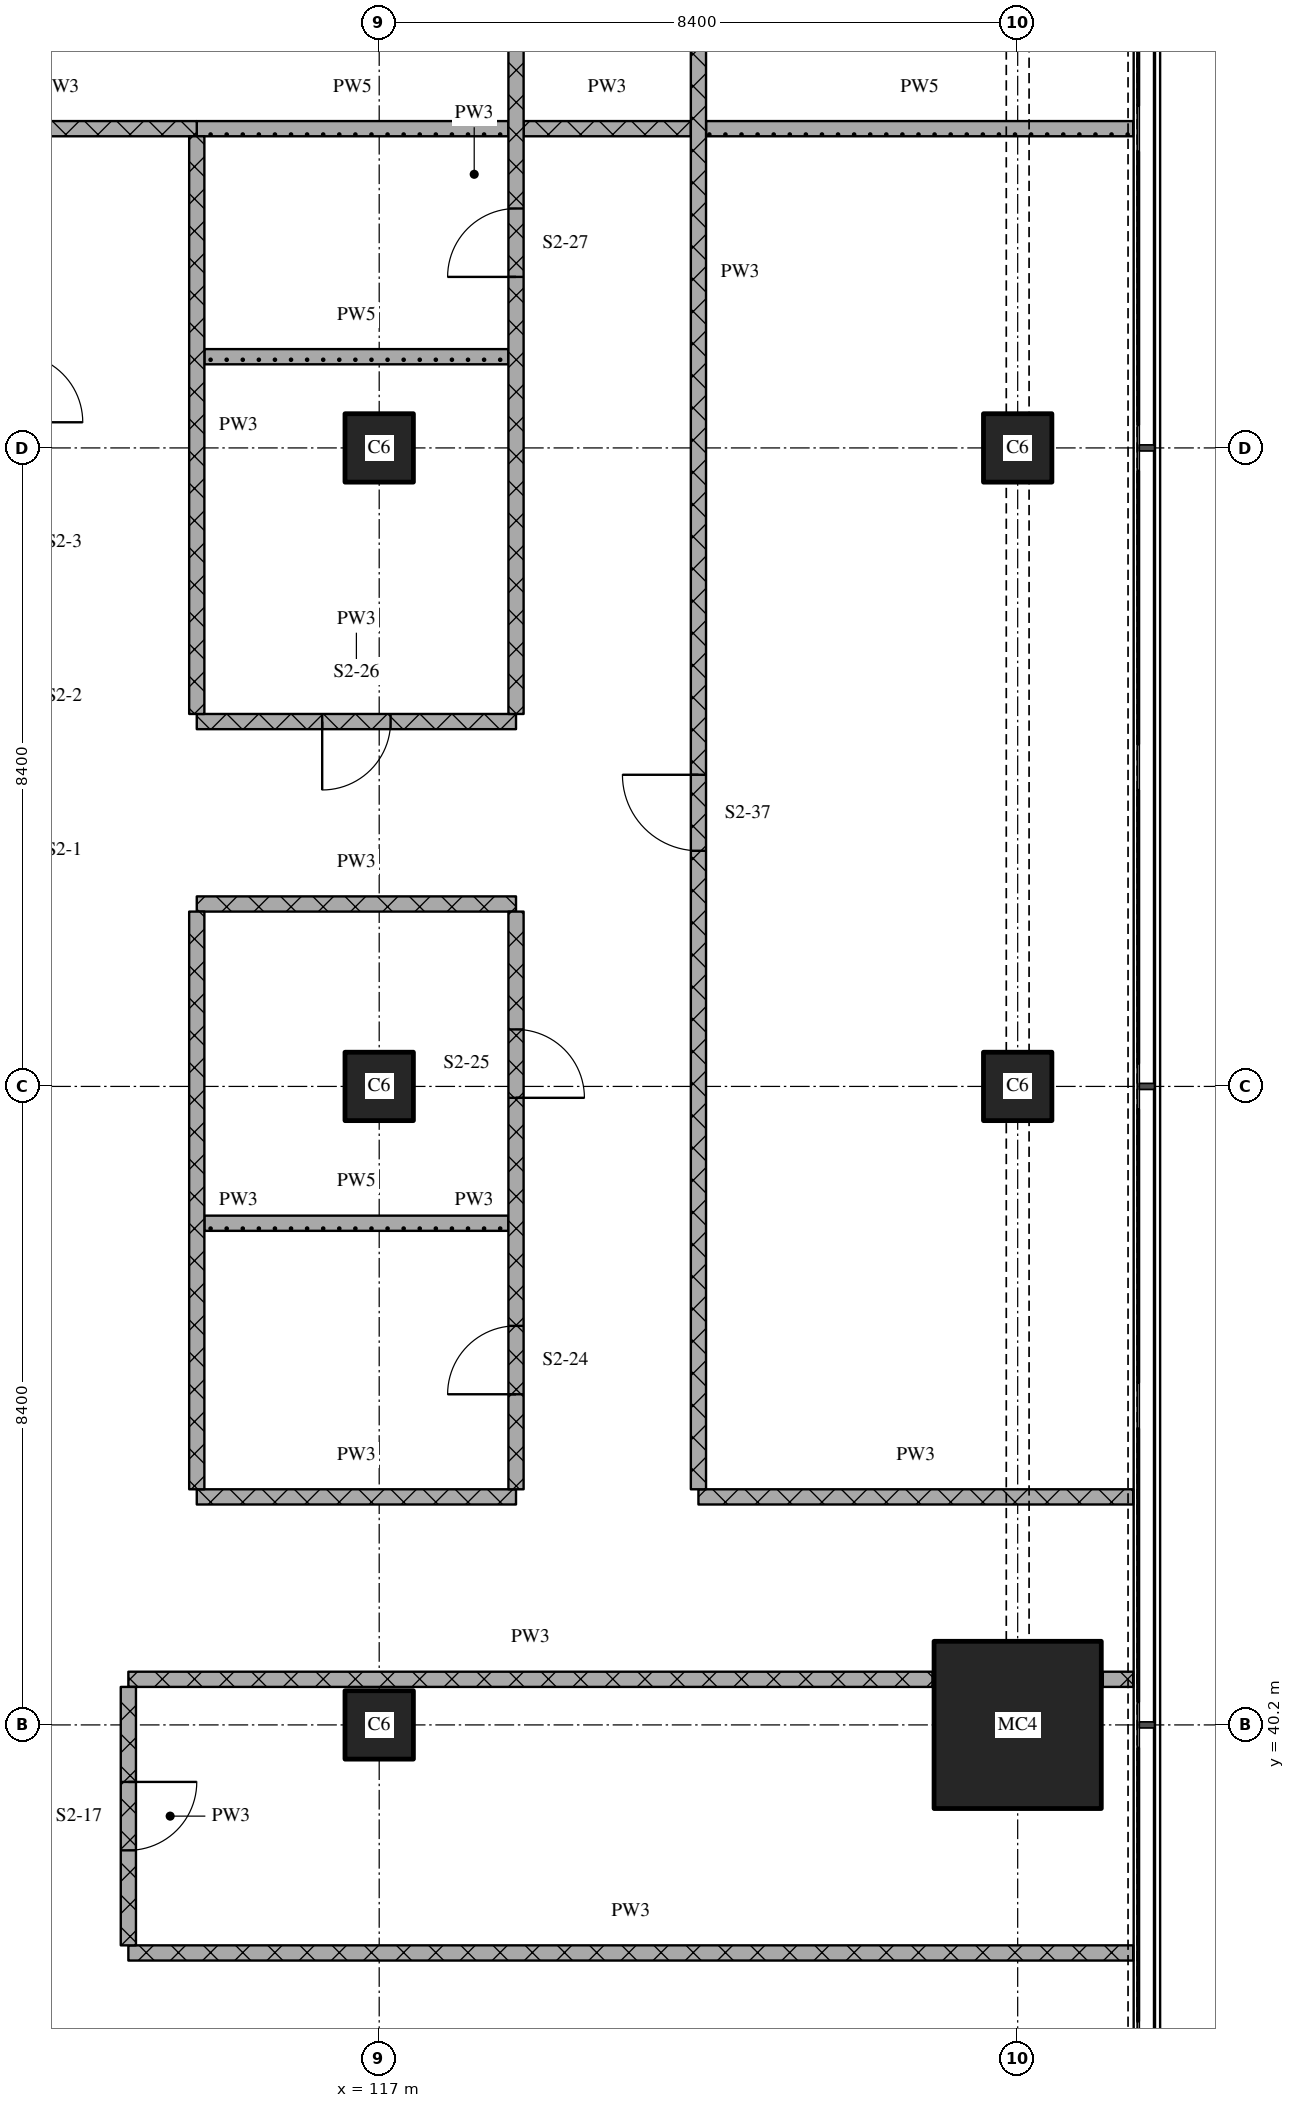
"""IFC4 building model, lengths in metres.
Left out: names, types, materials, properties, quantities, classifications, styles, units other than length and angle.
Written with IfcOpenShell. Run it as: python <this file> out.ifc"""

import sys

from ifc_helpers import new_model, si_unit, direction, frame, frame_2d, origin, origin_2d, place, context, subcontext, project, spatial, rectangle, extrude, element, fill, save


model = new_model("IFC4")
c1 = context("Model", 3, precision=1e-05, world=origin(), true_north=direction((0.0, 1.0)))
c2 = subcontext(c1, "Body", "Model", "MODEL_VIEW")
j1 = project(units=[si_unit("LENGTHUNIT", "METRE"), si_unit("PLANEANGLEUNIT", "RADIAN")], contexts=[c1])
p1 = place(None, origin())
s1 = spatial("IfcSite", under=j1, at=p1, CompositionType="ELEMENT")
p2 = place(p1, origin())
s2 = spatial("IfcBuilding", under=s1, at=p2, CompositionType="ELEMENT")
p3 = place(p2, frame((0.0, 0.0, 23.7)))
s3 = spatial("IfcBuildingStorey", under=s2, at=p3, CompositionType="ELEMENT", Elevation=23.7)
for number, where, z_axis, x_axis in (
    (1, (117.0, 40.2, 0.0), (0.0, 0.0, 1.0), (1.0, 0.0, 0.0)),
    (2, (117.0, 48.6, 0.0), (0.0, 0.0, 1.0), (1.0, 0.0, 0.0)),
    (3, (117.0, 57.0, 0.0), (0.0, 0.0, 1.0), (1.0, 0.0, 0.0)),
):
    element("IfcColumn", number, at=place(p3, frame(where, z_axis=z_axis, x_axis=x_axis)), inside=s3, PredefinedType="COLUMN", context=c2, shape_type="SweptSolid", body=[
        extrude(rectangle(XDim=0.9, YDim=0.9, at=origin_2d()), origin(), (0.0, 0.0, 1.0), 4.5),
    ])
p4 = place(p3, frame((125.4, 40.2, 0.0), z_axis=(0.0, 0.0, 1.0), x_axis=(1.0, 0.0, 0.0)))
e4 = element("IfcColumn", 4, at=p4, inside=s3, PredefinedType="COLUMN", context=c2, shape_type="SweptSolid", body=[
    extrude(rectangle(XDim=2.2, YDim=2.2, at=origin_2d()), origin(), (0.0, 0.0, 1.0), 4.5),
])
for number, where, z_axis, x_axis in (
    (5, (125.4, 48.6, 0.0), (0.0, 0.0, 1.0), (1.0, 0.0, 0.0)),
    (6, (125.4, 57.0, 0.0), (0.0, 0.0, 1.0), (1.0, 0.0, 0.0)),
):
    element("IfcColumn", number, at=place(p3, frame(where, z_axis=z_axis, x_axis=x_axis)), inside=s3, PredefinedType="COLUMN", context=c2, shape_type="SweptSolid", body=[
        extrude(rectangle(XDim=0.9, YDim=0.9, at=origin_2d()), origin(), (0.0, 0.0, 1.0), 4.5),
    ])
p5 = place(p3, frame((113.7, 37.2, 0.0), z_axis=(0.0, 0.0, 1.0), x_axis=(1.0, 0.0, 0.0)))
e7 = element("IfcWall", 7, at=p5, inside=s3, PredefinedType="PARTITIONING", context=c2, shape_type="SweptSolid", body=[
    extrude(rectangle(XDim=13.22, YDim=0.2, at=frame_2d((6.61, 0.0))), origin(), (0.0, 0.0, 1.0), 4.2),
])
p6 = place(p3, frame((113.7, 40.8, 0.0), z_axis=(0.0, 0.0, 1.0), x_axis=(1.0, 0.0, 0.0)))
e8 = element("IfcWall", 8, at=p6, inside=s3, PredefinedType="PARTITIONING", context=c2, shape_type="SweptSolid", body=[
    extrude(rectangle(XDim=10.58, YDim=0.2, at=frame_2d((5.29, 0.0))), origin(), (0.0, 0.0, 1.0), 4.2),
])
p7 = place(p3, frame((126.52, 40.8, 0.0), z_axis=(0.0, 0.0, 1.0), x_axis=(1.0, 0.0, 0.0)))
e9 = element("IfcWall", 9, at=p7, inside=s3, PredefinedType="PARTITIONING", context=c2, shape_type="SweptSolid", body=[
    extrude(rectangle(XDim=0.4, YDim=0.2, at=frame_2d((0.2, 0.0))), origin(), (0.0, 0.0, 1.0), 4.2),
])
p8 = place(p3, frame((114.6, 43.2, 0.0), z_axis=(0.0, 0.0, 1.0), x_axis=(1.0, 0.0, 0.0)))
e10 = element("IfcWall", 10, at=p8, inside=s3, PredefinedType="PARTITIONING", context=c2, shape_type="SweptSolid", body=[
    extrude(rectangle(XDim=4.2, YDim=0.2, at=frame_2d((2.1, 0.0))), origin(), (0.0, 0.0, 1.0), 4.2),
])
p9 = place(p3, frame((121.2, 43.2, 0.0), z_axis=(0.0, 0.0, 1.0), x_axis=(1.0, 0.0, 0.0)))
e11 = element("IfcWall", 11, at=p9, inside=s3, PredefinedType="PARTITIONING", context=c2, shape_type="SweptSolid", body=[
    extrude(rectangle(XDim=5.72, YDim=0.2, at=frame_2d((2.86, 0.0))), origin(), (0.0, 0.0, 1.0), 4.2),
])
p10 = place(p3, frame((114.7, 46.8, 0.0), z_axis=(0.0, 0.0, 1.0), x_axis=(1.0, 0.0, 0.0)))
e12 = element("IfcWall", 12, at=p10, inside=s3, PredefinedType="PARTITIONING", context=c2, shape_type="SweptSolid", body=[
    extrude(rectangle(XDim=4.0, YDim=0.2, at=frame_2d((2.0, 0.0))), origin(), (0.0, 0.0, 1.0), 4.2),
])
p11 = place(p3, frame((114.6, 51.0, 0.0), z_axis=(0.0, 0.0, 1.0), x_axis=(1.0, 0.0, 0.0)))
e13 = element("IfcWall", 13, at=p11, inside=s3, PredefinedType="PARTITIONING", context=c2, shape_type="SweptSolid", body=[
    extrude(rectangle(XDim=4.2, YDim=0.2, at=frame_2d((2.1, 0.0))), origin(), (0.0, 0.0, 1.0), 4.2),
])
p12 = place(p3, frame((114.6, 53.4, 0.0), z_axis=(0.0, 0.0, 1.0), x_axis=(1.0, 0.0, 0.0)))
e14 = element("IfcWall", 14, at=p12, inside=s3, PredefinedType="PARTITIONING", context=c2, shape_type="SweptSolid", body=[
    extrude(rectangle(XDim=4.2, YDim=0.2, at=frame_2d((2.1, 0.0))), origin(), (0.0, 0.0, 1.0), 4.2),
])
p13 = place(p12, frame((1.65, 0.0, 0.0)))
e15 = element("IfcOpeningElement", 15, at=p13, cuts=e14, PredefinedType="OPENING", context=c2, shape_type="SweptSolid", body=[
    extrude(rectangle(XDim=0.9, YDim=2.1, at=frame_2d((0.45, 1.05))), frame((0.0, 0.11, 0.0), z_axis=(0.0, -1.0, 0.0), x_axis=(1.0, 0.0, 0.0)), (0.0, 0.0, 1.0), 0.22),
])
p14 = place(p3, frame((114.7, 58.2, 0.0), z_axis=(0.0, 0.0, 1.0), x_axis=(1.0, 0.0, 0.0)))
e16 = element("IfcWall", 16, at=p14, inside=s3, PredefinedType="PARTITIONING", context=c2, shape_type="SweptSolid", body=[
    extrude(rectangle(XDim=4.0, YDim=0.2, at=frame_2d((2.0, 0.0))), origin(), (0.0, 0.0, 1.0), 4.2),
])
p15 = place(p3, frame((111.0, 61.2, 0.0), z_axis=(0.0, 0.0, 1.0), x_axis=(1.0, 0.0, 0.0)))
e17 = element("IfcWall", 17, at=p15, inside=s3, PredefinedType="PARTITIONING", context=c2, shape_type="SweptSolid", body=[
    extrude(rectangle(XDim=3.6, YDim=0.2, at=frame_2d((1.8, 0.0))), origin(), (0.0, 0.0, 1.0), 4.2),
])
p16 = place(p3, frame((118.9, 61.2, 0.0), z_axis=(0.0, 0.0, 1.0), x_axis=(1.0, 0.0, 0.0)))
e18 = element("IfcWall", 18, at=p16, inside=s3, PredefinedType="PARTITIONING", context=c2, shape_type="SweptSolid", body=[
    extrude(rectangle(XDim=2.2, YDim=0.2, at=frame_2d((1.1, 0.0))), origin(), (0.0, 0.0, 1.0), 4.2),
])
p17 = place(p3, frame((114.6, 61.2, 0.0), z_axis=(0.0, 0.0, 1.0), x_axis=(1.0, 0.0, 0.0)))
e19 = element("IfcWall", 19, at=p17, inside=s3, PredefinedType="PARTITIONING", context=c2, shape_type="SweptSolid", body=[
    extrude(rectangle(XDim=4.1, YDim=0.2, at=frame_2d((2.05, 0.0))), origin(), (0.0, 0.0, 1.0), 4.2),
])
p18 = place(p3, frame((121.3, 61.2, 0.0), z_axis=(0.0, 0.0, 1.0), x_axis=(1.0, 0.0, 0.0)))
e20 = element("IfcWall", 20, at=p18, inside=s3, PredefinedType="PARTITIONING", context=c2, shape_type="SweptSolid", body=[
    extrude(rectangle(XDim=5.62, YDim=0.2, at=frame_2d((2.81, 0.0))), origin(), (0.0, 0.0, 1.0), 4.2),
])
p19 = place(p3, frame((113.7, 40.7, 0.0), z_axis=(0.0, 0.0, 1.0), x_axis=(0.0, -1.0, 0.0)))
e21 = element("IfcWall", 21, at=p19, inside=s3, PredefinedType="PARTITIONING", context=c2, shape_type="SweptSolid", body=[
    extrude(rectangle(XDim=3.4, YDim=0.2, at=frame_2d((1.7, 0.0))), origin(), (0.0, 0.0, 1.0), 4.2),
])
p20 = place(p19, frame((1.25, 0.0, 0.0)))
e22 = element("IfcOpeningElement", 22, at=p20, cuts=e21, PredefinedType="OPENING", context=c2, shape_type="SweptSolid", body=[
    extrude(rectangle(XDim=0.9, YDim=2.1, at=frame_2d((0.45, 1.05))), frame((0.0, 0.11, 0.0), z_axis=(0.0, -1.0, 0.0), x_axis=(1.0, 0.0, 0.0)), (0.0, 0.0, 1.0), 0.22),
])
p21 = place(p3, frame((114.6, 50.9, 0.0), z_axis=(0.0, 0.0, 1.0), x_axis=(0.0, -1.0, 0.0)))
e23 = element("IfcWall", 23, at=p21, inside=s3, PredefinedType="PARTITIONING", context=c2, shape_type="SweptSolid", body=[
    extrude(rectangle(XDim=7.6, YDim=0.2, at=frame_2d((3.8, 0.0))), origin(), (0.0, 0.0, 1.0), 4.2),
])
p22 = place(p3, frame((114.6, 61.1, 0.0), z_axis=(0.0, 0.0, 1.0), x_axis=(0.0, -1.0, 0.0)))
e24 = element("IfcWall", 24, at=p22, inside=s3, PredefinedType="PARTITIONING", context=c2, shape_type="SweptSolid", body=[
    extrude(rectangle(XDim=7.6, YDim=0.2, at=frame_2d((3.8, 0.0))), origin(), (0.0, 0.0, 1.0), 4.2),
])
p23 = place(p3, frame((118.8, 43.3, 0.0), z_axis=(0.0, 0.0, 1.0), x_axis=(0.0, 1.0, 0.0)))
e25 = element("IfcWall", 25, at=p23, inside=s3, PredefinedType="PARTITIONING", context=c2, shape_type="SweptSolid", body=[
    extrude(rectangle(XDim=7.6, YDim=0.2, at=frame_2d((3.8, 0.0))), origin(), (0.0, 0.0, 1.0), 4.2),
])
p24 = place(p23, frame((1.25, 0.0, 0.0)))
e26 = element("IfcOpeningElement", 26, at=p24, cuts=e25, PredefinedType="OPENING", context=c2, shape_type="SweptSolid", body=[
    extrude(rectangle(XDim=0.9, YDim=2.1, at=frame_2d((0.45, 1.05))), frame((0.0, 0.11, 0.0), z_axis=(0.0, -1.0, 0.0), x_axis=(1.0, 0.0, 0.0)), (0.0, 0.0, 1.0), 0.22),
])
p25 = place(p23, frame((5.15, 0.0, 0.0)))
e27 = element("IfcOpeningElement", 27, at=p25, cuts=e25, PredefinedType="OPENING", context=c2, shape_type="SweptSolid", body=[
    extrude(rectangle(XDim=0.9, YDim=2.1, at=frame_2d((0.45, 1.05))), frame((0.0, 0.11, 0.0), z_axis=(0.0, -1.0, 0.0), x_axis=(1.0, 0.0, 0.0)), (0.0, 0.0, 1.0), 0.22),
])
p26 = place(p3, frame((118.8, 53.5, 0.0), z_axis=(0.0, 0.0, 1.0), x_axis=(0.0, 1.0, 0.0)))
e28 = element("IfcWall", 28, at=p26, inside=s3, PredefinedType="PARTITIONING", context=c2, shape_type="SweptSolid", body=[
    extrude(rectangle(XDim=14.2, YDim=0.2, at=frame_2d((7.1, 0.0))), origin(), (0.0, 0.0, 1.0), 4.2),
])
p27 = place(p26, frame((5.75, 0.0, 0.0)))
e29 = element("IfcOpeningElement", 29, at=p27, cuts=e28, PredefinedType="OPENING", context=c2, shape_type="SweptSolid", body=[
    extrude(rectangle(XDim=0.9, YDim=2.1, at=frame_2d((0.45, 1.05))), frame((0.0, 0.11, 0.0), z_axis=(0.0, -1.0, 0.0), x_axis=(1.0, 0.0, 0.0)), (0.0, 0.0, 1.0), 0.22),
])
p28 = place(p26, frame((10.55, 0.0, 0.0)))
e30 = element("IfcOpeningElement", 30, at=p28, cuts=e28, PredefinedType="OPENING", context=c2, shape_type="SweptSolid", body=[
    extrude(rectangle(XDim=0.9, YDim=2.1, at=frame_2d((0.45, 1.05))), frame((0.0, 0.11, 0.0), z_axis=(0.0, -1.0, 0.0), x_axis=(1.0, 0.0, 0.0)), (0.0, 0.0, 1.0), 0.22),
])
p29 = place(p3, frame((121.2, 75.32, 0.0), z_axis=(0.0, 0.0, 1.0), x_axis=(0.0, -1.0, 0.0)))
e31 = element("IfcWall", 31, at=p29, inside=s3, PredefinedType="PARTITIONING", context=c2, shape_type="SweptSolid", body=[
    extrude(rectangle(XDim=32.02, YDim=0.2, at=frame_2d((16.01, 0.0))), origin(), (0.0, 0.0, 1.0), 4.2),
])
p30 = place(p29, frame((7.729, 0.0, 0.0)))
e32 = element("IfcOpeningElement", 32, at=p30, cuts=e31, PredefinedType="OPENING", context=c2, shape_type="SweptSolid", body=[
    extrude(rectangle(XDim=1.0, YDim=2.1, at=frame_2d((0.5, 1.05))), frame((0.0, 0.11, 0.0), z_axis=(0.0, -1.0, 0.0), x_axis=(1.0, 0.0, 0.0)), (0.0, 0.0, 1.0), 0.22),
])
p31 = place(p29, frame((22.62, 0.0, 0.0)))
e33 = element("IfcOpeningElement", 33, at=p31, cuts=e31, PredefinedType="OPENING", context=c2, shape_type="SweptSolid", body=[
    extrude(rectangle(XDim=1.0, YDim=2.1, at=frame_2d((0.5, 1.05))), frame((0.0, 0.11, 0.0), z_axis=(0.0, -1.0, 0.0), x_axis=(1.0, 0.0, 0.0)), (0.0, 0.0, 1.0), 0.22),
])
p32 = place(p13, origin())
e34 = element("IfcDoor", 34, at=p32, inside=s3, OperationType="SINGLE_SWING_RIGHT", PredefinedType="DOOR", context=c2, shape_type="SweptSolid", body=[
    extrude(rectangle(XDim=0.9, YDim=2.1, at=frame_2d((0.45, 1.05))), frame((0.0, 0.025, 0.0), z_axis=(0.0, -1.0, 0.0), x_axis=(1.0, 0.0, 0.0)), (0.0, 0.0, 1.0), 0.05),
])
fill(e15, e34)
p33 = place(p20, origin())
e35 = element("IfcDoor", 35, at=p33, inside=s3, OperationType="SINGLE_SWING_LEFT", PredefinedType="DOOR", context=c2, shape_type="SweptSolid", body=[
    extrude(rectangle(XDim=0.9, YDim=2.1, at=frame_2d((0.45, 1.05))), frame((0.0, 0.025, 0.0), z_axis=(0.0, -1.0, 0.0), x_axis=(1.0, 0.0, 0.0)), (0.0, 0.0, 1.0), 0.05),
])
fill(e22, e35)
p34 = place(p24, origin())
e36 = element("IfcDoor", 36, at=p34, inside=s3, OperationType="SINGLE_SWING_LEFT", PredefinedType="DOOR", context=c2, shape_type="SweptSolid", body=[
    extrude(rectangle(XDim=0.9, YDim=2.1, at=frame_2d((0.45, 1.05))), frame((0.0, 0.025, 0.0), z_axis=(0.0, -1.0, 0.0), x_axis=(1.0, 0.0, 0.0)), (0.0, 0.0, 1.0), 0.05),
])
fill(e26, e36)
p35 = place(p25, origin())
e37 = element("IfcDoor", 37, at=p35, inside=s3, OperationType="SINGLE_SWING_RIGHT", PredefinedType="DOOR", context=c2, shape_type="SweptSolid", body=[
    extrude(rectangle(XDim=0.9, YDim=2.1, at=frame_2d((0.45, 1.05))), frame((0.0, 0.025, 0.0), z_axis=(0.0, -1.0, 0.0), x_axis=(1.0, 0.0, 0.0)), (0.0, 0.0, 1.0), 0.05),
])
fill(e27, e37)
p36 = place(p27, origin())
e38 = element("IfcDoor", 38, at=p36, inside=s3, OperationType="SINGLE_SWING_LEFT", PredefinedType="DOOR", context=c2, shape_type="SweptSolid", body=[
    extrude(rectangle(XDim=0.9, YDim=2.1, at=frame_2d((0.45, 1.05))), frame((0.0, 0.025, 0.0), z_axis=(0.0, -1.0, 0.0), x_axis=(1.0, 0.0, 0.0)), (0.0, 0.0, 1.0), 0.05),
])
fill(e29, e38)
p37 = place(p31, origin())
e39 = element("IfcDoor", 39, at=p37, inside=s3, OperationType="SINGLE_SWING_RIGHT", PredefinedType="DOOR", context=c2, shape_type="SweptSolid", body=[
    extrude(rectangle(XDim=1.0, YDim=2.1, at=frame_2d((0.5, 1.05))), frame((0.0, 0.025, 0.0), z_axis=(0.0, -1.0, 0.0), x_axis=(1.0, 0.0, 0.0)), (0.0, 0.0, 1.0), 0.05),
])
fill(e33, e39)
save(model, sys.argv[1])
